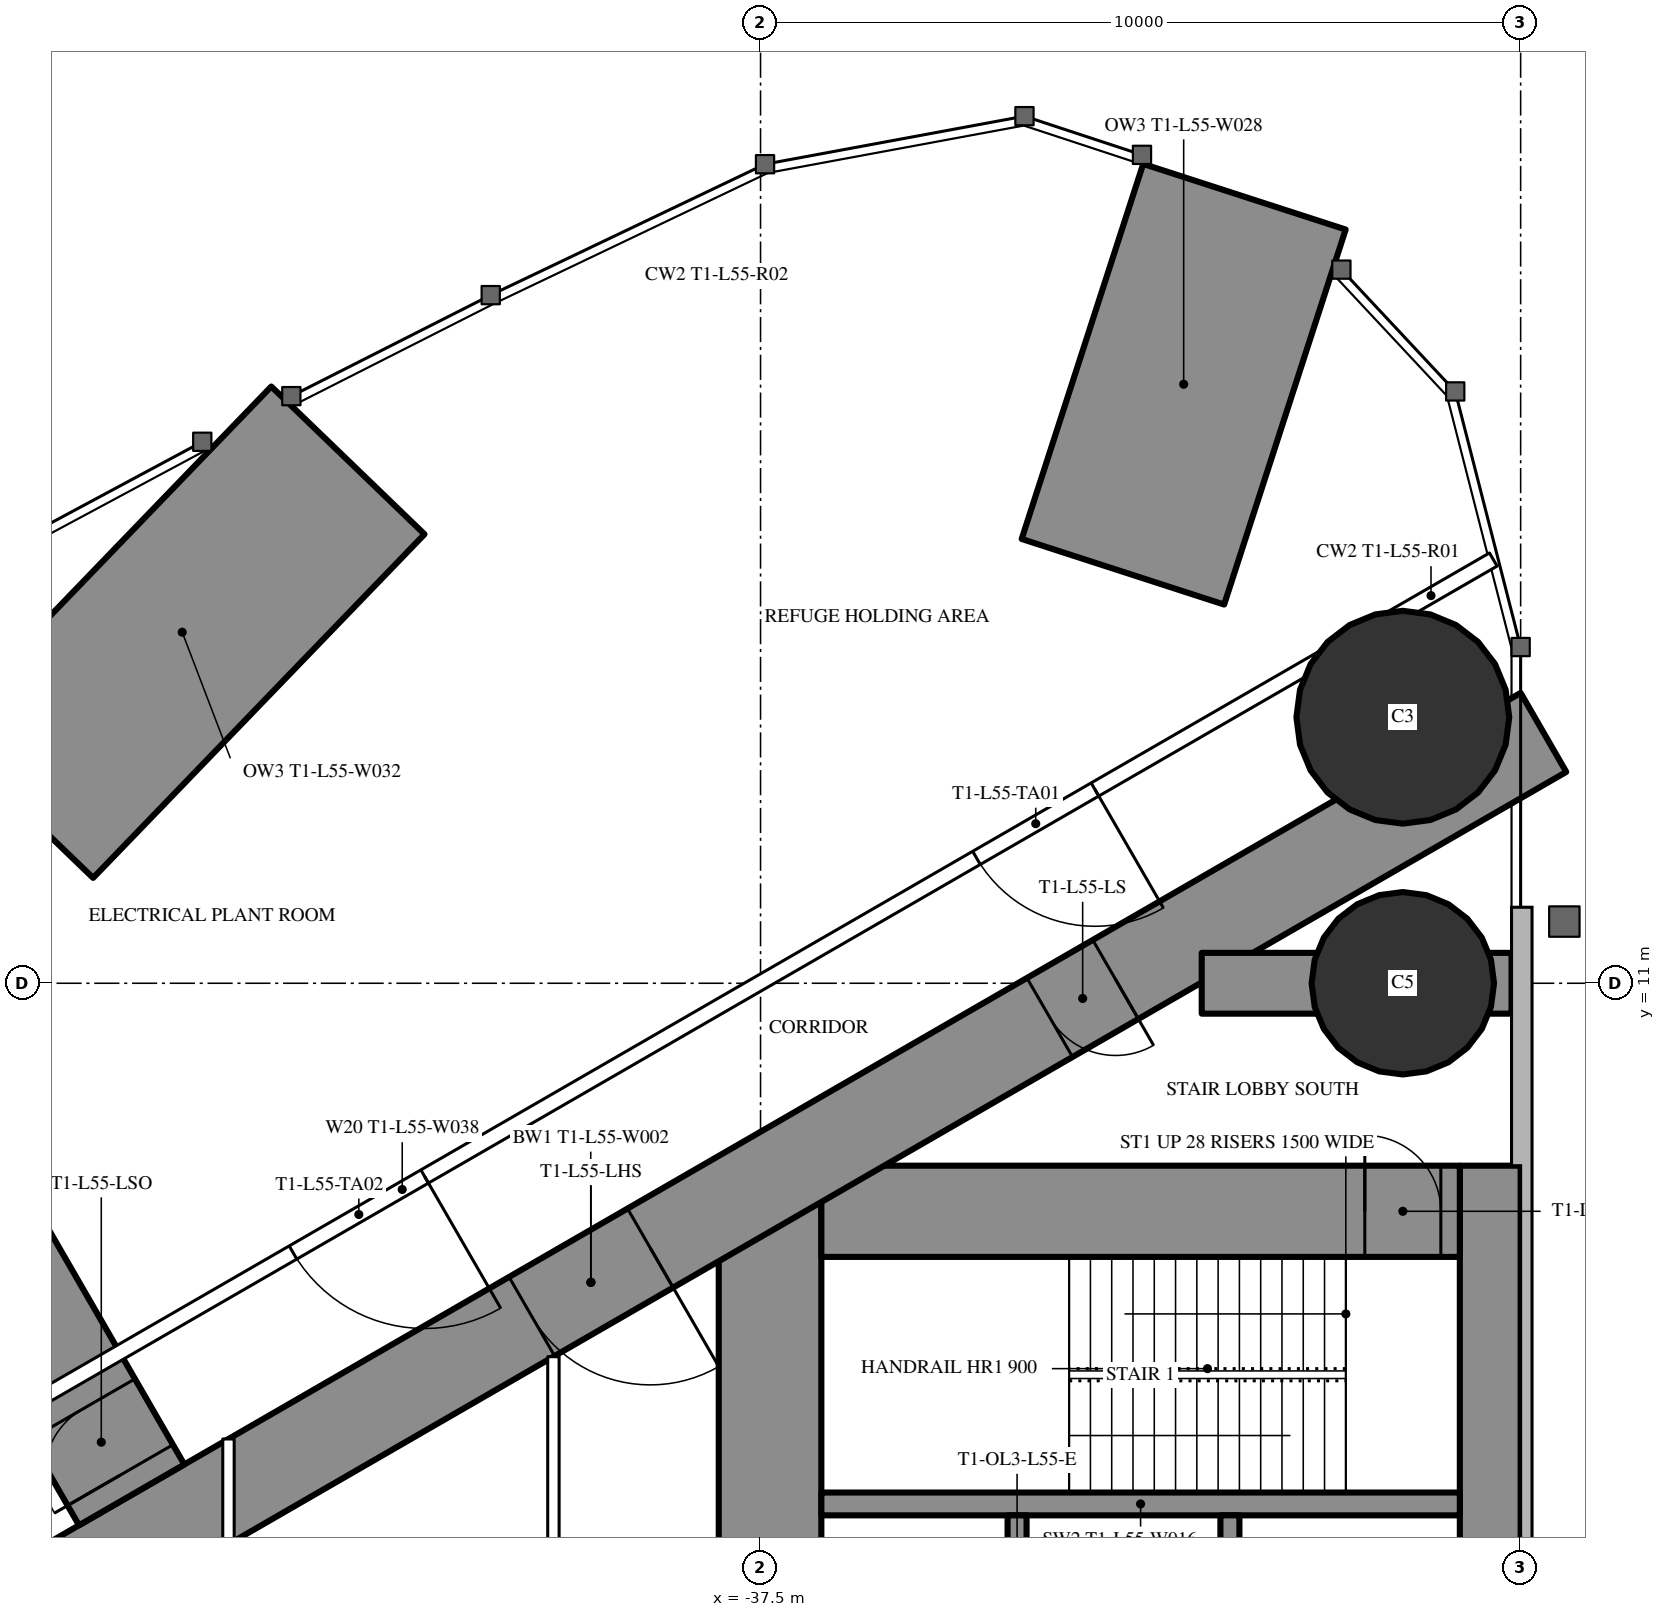
"""IFC4 building model, lengths in metres.
Left out: names, types, materials, properties, quantities, classifications, styles, units other than length and angle.
Written with IfcOpenShell. Run it as: python <this file> out.ifc"""

import sys

from ifc_helpers import new_model, si_unit, direction, frame, frame_2d, origin, origin_2d, place, context, subcontext, project, spatial, rectangle, circle, hollow_circle, extrude, element, fill, save


model = new_model("IFC4")
c1 = context("Model", 3, precision=1e-05, world=origin(), true_north=direction((0.0, 1.0)))
c2 = subcontext(c1, "Body", "Model", "MODEL_VIEW")
j1 = project(units=[si_unit("LENGTHUNIT", "METRE"), si_unit("PLANEANGLEUNIT", "RADIAN")], contexts=[c1])
p1 = place(None, origin())
s1 = spatial("IfcSite", under=j1, at=p1, CompositionType="ELEMENT")
p2 = place(p1, origin())
s2 = spatial("IfcBuilding", under=s1, at=p2, CompositionType="ELEMENT")
p3 = place(p2, frame((0.0, 0.0, 205.3)))
s3 = spatial("IfcBuildingStorey", under=s2, at=p3, CompositionType="ELEMENT", Elevation=205.3)
p4 = place(p3, frame((-31.134, 21.348, 0.0), z_axis=(0.0, 0.0, 1.0), x_axis=(-0.308266410133, -0.951300068529, 0.0)))
e1 = element("IfcWall", 1, at=p4, inside=s3, PredefinedType="SHEAR", context=c2, shape_type="SweptSolid", body=[
    extrude(rectangle(XDim=5.187, YDim=2.8, at=frame_2d((2.593, 0.0))), origin(), (0.0, 0.0, 1.0), 5.0),
])
p5 = place(p3, frame((-29.05, 11.0, 0.0), z_axis=(0.0, 0.0, 1.0), x_axis=(1.0, 0.0, 0.0)))
e2 = element("IfcColumn", 2, at=p5, inside=s3, PredefinedType="COLUMN", context=c2, shape_type="SweptSolid", body=[
    extrude(hollow_circle(Radius=1.2, WallThickness=0.09, at=origin_2d()), origin(), (0.0, 0.0, 1.0), 5.0),
])
p6 = place(p3, frame((-29.05, 14.5, 0.0), z_axis=(0.0, 0.0, 1.0), x_axis=(1.0, 0.0, 0.0)))
e3 = element("IfcColumn", 3, at=p6, inside=s3, PredefinedType="COLUMN", context=c2, shape_type="SweptSolid", body=[
    extrude(circle(Radius=1.4, at=origin_2d()), origin(), (0.0, 0.0, 1.0), 5.0),
])
p7 = place(p3, frame((-42.929, 17.879, 0.0), z_axis=(0.0, 0.0, 1.0), x_axis=(-0.694103918888, -0.719874815356, 0.0)))
e4 = element("IfcWall", 4, at=p7, inside=s3, PredefinedType="SHEAR", context=c2, shape_type="SweptSolid", body=[
    extrude(rectangle(XDim=6.281, YDim=2.8, at=frame_2d((3.141, 0.0))), origin(), (0.0, 0.0, 1.0), 5.0),
])
p8 = place(p3, frame((-27.9, 8.6, 0.0), z_axis=(0.0, 0.0, 1.0), x_axis=(0.0, -1.0, 0.0)))
e5 = element("IfcWall", 5, at=p8, inside=s3, PredefinedType="SHEAR", context=c2, shape_type="SweptSolid", body=[
    extrude(rectangle(XDim=17.2, YDim=0.8, at=frame_2d((8.6, 0.0))), origin(), (0.0, 0.0, 1.0), 5.0),
])
p9 = place(p8, frame((6.95, 0.0, 0.0)))
e6 = element("IfcOpeningElement", 6, at=p9, cuts=e5, PredefinedType="OPENING", context=c2, shape_type="SweptSolid", body=[
    extrude(rectangle(XDim=0.9, YDim=2.2, at=frame_2d((0.45, 1.1))), frame((0.0, 0.41, 0.0), z_axis=(0.0, -1.0, 0.0), x_axis=(1.0, 0.0, 0.0)), (0.0, 0.0, 1.0), 0.82),
])
p10 = place(p3, frame((-37.375, 8.6, 0.0), z_axis=(0.0, 0.0, 1.0), x_axis=(0.0, -1.0, 0.0)))
e7 = element("IfcWall", 7, at=p10, inside=s3, PredefinedType="SHEAR", context=c2, shape_type="SweptSolid", body=[
    extrude(rectangle(XDim=17.2, YDim=1.35, at=frame_2d((8.6, 0.0))), origin(), (0.0, 0.0, 1.0), 5.0),
])
p11 = place(p10, frame((7.7, 0.0, 0.0)))
e8 = element("IfcOpeningElement", 8, at=p11, cuts=e7, PredefinedType="OPENING", context=c2, shape_type="SweptSolid", body=[
    extrude(rectangle(XDim=1.8, YDim=2.2, at=frame_2d((0.9, 1.1))), frame((0.0, 0.685, 0.0), z_axis=(0.0, -1.0, 0.0), x_axis=(1.0, 0.0, 0.0)), (0.0, 0.0, 1.0), 1.37),
])
p12 = place(p3, frame((-28.3, 8.0, 0.0), z_axis=(0.0, 0.0, 1.0), x_axis=(-1.0, 0.0, 0.0)))
e9 = element("IfcWall", 9, at=p12, inside=s3, PredefinedType="SHEAR", context=c2, shape_type="SweptSolid", body=[
    extrude(rectangle(XDim=8.4, YDim=1.2, at=frame_2d((4.2, 0.0))), origin(), (0.0, 0.0, 1.0), 5.0),
])
p13 = place(p12, frame((0.25, 0.0, 0.0)))
e10 = element("IfcOpeningElement", 10, at=p13, cuts=e9, PredefinedType="OPENING", context=c2, shape_type="SweptSolid", body=[
    extrude(rectangle(XDim=1.0, YDim=2.2, at=frame_2d((0.5, 1.1))), frame((0.0, 0.61, 0.0), z_axis=(0.0, -1.0, 0.0), x_axis=(1.0, 0.0, 0.0)), (0.0, 0.0, 1.0), 1.22),
])
p14 = place(p3, frame((-28.3, 4.15, 0.0), z_axis=(0.0, 0.0, 1.0), x_axis=(-1.0, 0.0, 0.0)))
e11 = element("IfcWall", 11, at=p14, inside=s3, PredefinedType="SHEAR", context=c2, shape_type="SweptSolid", body=[
    extrude(rectangle(XDim=8.4, YDim=0.3, at=frame_2d((4.2, 0.0))), origin(), (0.0, 0.0, 1.0), 5.0),
])
p15 = place(p3, frame((-31.325, 4.0, 0.0), z_axis=(0.0, 0.0, 1.0), x_axis=(0.0, -1.0, 0.0)))
e12 = element("IfcWall", 12, at=p15, inside=s3, PredefinedType="SHEAR", context=c2, shape_type="SweptSolid", body=[
    extrude(rectangle(XDim=2.1, YDim=0.25, at=frame_2d((1.05, 0.0))), origin(), (0.0, 0.0, 1.0), 5.0),
])
p16 = place(p15, frame((0.5, 0.0, 0.0)))
e13 = element("IfcOpeningElement", 13, at=p16, cuts=e12, PredefinedType="OPENING", context=c2, shape_type="SweptSolid", body=[
    extrude(rectangle(XDim=1.1, YDim=2.2, at=frame_2d((0.55, 1.1))), frame((0.0, 0.135, 0.0), z_axis=(0.0, -1.0, 0.0), x_axis=(1.0, 0.0, 0.0)), (0.0, 0.0, 1.0), 0.27),
])
p17 = place(p3, frame((-34.125, 4.0, 0.0), z_axis=(0.0, 0.0, 1.0), x_axis=(0.0, -1.0, 0.0)))
e14 = element("IfcWall", 14, at=p17, inside=s3, PredefinedType="SHEAR", context=c2, shape_type="SweptSolid", body=[
    extrude(rectangle(XDim=2.35, YDim=0.25, at=frame_2d((1.175, 0.0))), origin(), (0.0, 0.0, 1.0), 5.0),
])
p18 = place(p17, frame((0.875, 0.0, 0.0)))
e15 = element("IfcOpeningElement", 15, at=p18, cuts=e14, PredefinedType="OPENING", context=c2, shape_type="SweptSolid", body=[
    extrude(rectangle(XDim=0.6, YDim=2.0, at=frame_2d((0.3, 1.0))), frame((0.0, 0.135, 0.0), z_axis=(0.0, -1.0, 0.0), x_axis=(1.0, 0.0, 0.0)), (0.0, 0.0, 1.0), 0.27),
])
p19 = place(p3, frame((-27.2, 14.3, 0.0), z_axis=(0.0, 0.0, 1.0), x_axis=(-0.866026593062, -0.499997940104, 0.0)))
e16 = element("IfcWall", 16, at=p19, inside=s3, PredefinedType="SHEAR", context=c2, shape_type="SweptSolid", body=[
    extrude(rectangle(XDim=28.946, YDim=1.2, at=frame_2d((14.473, 0.0))), origin(), (0.0, 0.0, 1.0), 5.0),
])
p20 = place(p19, frame((6.5, 0.0, 0.0)))
e17 = element("IfcOpeningElement", 17, at=p20, cuts=e16, PredefinedType="OPENING", context=c2, shape_type="SweptSolid", body=[
    extrude(rectangle(XDim=1.0, YDim=2.2, at=frame_2d((0.5, 1.1))), frame((0.0, 0.61, 0.0), z_axis=(0.0, -1.0, 0.0), x_axis=(1.0, 0.0, 0.0)), (0.0, 0.0, 1.0), 1.22),
])
p21 = place(p19, frame((13.568, 0.0, 0.0)))
e18 = element("IfcOpeningElement", 18, at=p21, cuts=e16, PredefinedType="OPENING", context=c2, shape_type="SweptSolid", body=[
    extrude(rectangle(XDim=1.8, YDim=2.2, at=frame_2d((0.9, 1.1))), frame((0.0, 0.61, 0.0), z_axis=(0.0, -1.0, 0.0), x_axis=(1.0, 0.0, 0.0)), (0.0, 0.0, 1.0), 1.22),
])
p22 = place(p3, frame((-27.62, 11.0, 0.0), z_axis=(0.0, 0.0, 1.0), x_axis=(-1.0, 0.0, 0.0)))
e19 = element("IfcWall", 19, at=p22, inside=s3, PredefinedType="SHEAR", context=c2, shape_type="SweptSolid", body=[
    extrude(rectangle(XDim=4.076, YDim=0.8, at=frame_2d((2.038, 0.0))), origin(), (0.0, 0.0, 1.0), 5.0),
])
p23 = place(p3, frame((-45.773, 4.27, 0.0), z_axis=(0.0, 0.0, 1.0), x_axis=(-0.499995723283, 0.866027872934, 0.0)))
e20 = element("IfcWall", 20, at=p23, inside=s3, PredefinedType="SHEAR", context=c2, shape_type="SweptSolid", body=[
    extrude(rectangle(XDim=10.131, YDim=1.6, at=frame_2d((5.065, 0.0))), origin(), (0.0, 0.0, 1.0), 5.0),
])
p24 = place(p23, frame((0.3, 0.0, 0.0)))
e21 = element("IfcOpeningElement", 21, at=p24, cuts=e20, PredefinedType="OPENING", context=c2, shape_type="SweptSolid", body=[
    extrude(rectangle(XDim=1.0, YDim=2.2, at=frame_2d((0.5, 1.1))), frame((0.0, 0.81, 0.0), z_axis=(0.0, -1.0, 0.0), x_axis=(1.0, 0.0, 0.0)), (0.0, 0.0, 1.0), 1.62),
])
p25 = place(p3, frame((-27.86, 16.575, 0.0), z_axis=(0.0, 0.0, 1.0), x_axis=(-0.866025533911, -0.499999774615, 0.0)))
e22 = element("IfcWall", 22, at=p25, inside=s3, PredefinedType="PARTITIONING", context=c2, shape_type="SweptSolid", body=[
    extrude(rectangle(XDim=33.149, YDim=0.2, at=frame_2d((16.575, 0.0))), origin(), (0.0, 0.0, 1.0), 4.75),
])
p26 = place(p25, frame((6.051, 0.0, 0.0)))
e23 = element("IfcOpeningElement", 23, at=p26, cuts=e22, PredefinedType="OPENING", context=c2, shape_type="SweptSolid", body=[
    extrude(rectangle(XDim=1.8, YDim=2.2, at=frame_2d((0.9, 1.1))), frame((0.0, 0.11, 0.0), z_axis=(0.0, -1.0, 0.0), x_axis=(1.0, 0.0, 0.0)), (0.0, 0.0, 1.0), 0.22),
])
p27 = place(p25, frame((16.234, 0.0, 0.0)))
e24 = element("IfcOpeningElement", 24, at=p27, cuts=e22, PredefinedType="OPENING", context=c2, shape_type="SweptSolid", body=[
    extrude(rectangle(XDim=2.0, YDim=2.4, at=frame_2d((1.0, 1.2))), frame((0.0, 0.11, 0.0), z_axis=(0.0, -1.0, 0.0), x_axis=(1.0, 0.0, 0.0)), (0.0, 0.0, 1.0), 0.22),
])
p28 = place(p25, frame((26.082, 0.0, 0.0)))
e25 = element("IfcOpeningElement", 25, at=p28, cuts=e22, PredefinedType="OPENING", context=c2, shape_type="SweptSolid", body=[
    extrude(rectangle(XDim=2.0, YDim=2.4, at=frame_2d((1.0, 1.2))), frame((0.0, 0.11, 0.0), z_axis=(0.0, -1.0, 0.0), x_axis=(1.0, 0.0, 0.0)), (0.0, 0.0, 1.0), 0.22),
])
p29 = place(p3, frame((-40.225, 6.087, 0.0), z_axis=(0.0, 0.0, 1.0), x_axis=(0.0, -1.0, 0.0)))
e26 = element("IfcWall", 26, at=p29, inside=s3, PredefinedType="PARTITIONING", context=c2, shape_type="SweptSolid", body=[
    extrude(rectangle(XDim=12.174, YDim=0.15, at=frame_2d((6.087, 0.0))), origin(), (0.0, 0.0, 1.0), 4.75),
])
p30 = place(p29, frame((5.187, 0.0, 0.0)))
e27 = element("IfcOpeningElement", 27, at=p30, cuts=e26, PredefinedType="OPENING", context=c2, shape_type="SweptSolid", body=[
    extrude(rectangle(XDim=1.8, YDim=2.2, at=frame_2d((0.9, 1.1))), frame((0.0, 0.085, 0.0), z_axis=(0.0, -1.0, 0.0), x_axis=(1.0, 0.0, 0.0)), (0.0, 0.0, 1.0), 0.17),
])
p31 = place(p3, frame((-44.5, 5.005, 0.0), z_axis=(0.0, 0.0, 1.0), x_axis=(0.0, -1.0, 0.0)))
e28 = element("IfcWall", 28, at=p31, inside=s3, PredefinedType="PARTITIONING", context=c2, shape_type="SweptSolid", body=[
    extrude(rectangle(XDim=10.009, YDim=0.15, at=frame_2d((5.005, 0.0))), origin(), (0.0, 0.0, 1.0), 3.55),
])
p32 = place(p31, frame((4.505, 0.0, 0.0)))
e29 = element("IfcOpeningElement", 29, at=p32, cuts=e28, PredefinedType="OPENING", context=c2, shape_type="SweptSolid", body=[
    extrude(rectangle(XDim=1.0, YDim=2.2, at=frame_2d((0.5, 1.1))), frame((0.0, 0.085, 0.0), z_axis=(0.0, -1.0, 0.0), x_axis=(1.0, 0.0, 0.0)), (0.0, 0.0, 1.0), 0.17),
])
p33 = place(p24, origin())
e30 = element("IfcDoor", 30, at=p33, inside=s3, OperationType="SINGLE_SWING_LEFT", PredefinedType="DOOR", context=c2, shape_type="SweptSolid", body=[
    extrude(rectangle(XDim=1.0, YDim=2.2, at=frame_2d((0.5, 1.1))), frame((0.0, 0.025, 0.0), z_axis=(0.0, -1.0, 0.0), x_axis=(1.0, 0.0, 0.0)), (0.0, 0.0, 1.0), 0.05),
])
fill(e21, e30)
p34 = place(p26, origin())
e31 = element("IfcDoor", 31, at=p34, inside=s3, OperationType="DOUBLE_DOOR_SINGLE_SWING", PredefinedType="DOOR", context=c2, shape_type="SweptSolid", body=[
    extrude(rectangle(XDim=1.8, YDim=2.2, at=frame_2d((0.9, 1.1))), frame((0.0, 0.025, 0.0), z_axis=(0.0, -1.0, 0.0), x_axis=(1.0, 0.0, 0.0)), (0.0, 0.0, 1.0), 0.05),
])
fill(e23, e31)
p35 = place(p27, origin())
e32 = element("IfcDoor", 32, at=p35, inside=s3, OperationType="DOUBLE_DOOR_SINGLE_SWING", PredefinedType="DOOR", context=c2, shape_type="SweptSolid", body=[
    extrude(rectangle(XDim=2.0, YDim=2.4, at=frame_2d((1.0, 1.2))), frame((0.0, 0.025, 0.0), z_axis=(0.0, -1.0, 0.0), x_axis=(1.0, 0.0, 0.0)), (0.0, 0.0, 1.0), 0.05),
])
fill(e24, e32)
p36 = place(p20, origin())
e33 = element("IfcDoor", 33, at=p36, inside=s3, OperationType="SINGLE_SWING_LEFT", PredefinedType="DOOR", context=c2, shape_type="SweptSolid", body=[
    extrude(rectangle(XDim=1.0, YDim=2.2, at=frame_2d((0.5, 1.1))), frame((0.0, 0.025, 0.0), z_axis=(0.0, -1.0, 0.0), x_axis=(1.0, 0.0, 0.0)), (0.0, 0.0, 1.0), 0.05),
])
fill(e17, e33)
p37 = place(p21, origin())
e34 = element("IfcDoor", 34, at=p37, inside=s3, OperationType="DOUBLE_DOOR_SINGLE_SWING", PredefinedType="DOOR", context=c2, shape_type="SweptSolid", body=[
    extrude(rectangle(XDim=1.8, YDim=2.2, at=frame_2d((0.9, 1.1))), frame((0.0, 0.025, 0.0), z_axis=(0.0, -1.0, 0.0), x_axis=(1.0, 0.0, 0.0)), (0.0, 0.0, 1.0), 0.05),
])
fill(e18, e34)
p38 = place(p13, origin())
e35 = element("IfcDoor", 35, at=p38, inside=s3, OperationType="SINGLE_SWING_RIGHT", PredefinedType="DOOR", context=c2, shape_type="SweptSolid", body=[
    extrude(rectangle(XDim=1.0, YDim=2.2, at=frame_2d((0.5, 1.1))), frame((0.0, 0.025, 0.0), z_axis=(0.0, -1.0, 0.0), x_axis=(1.0, 0.0, 0.0)), (0.0, 0.0, 1.0), 0.05),
])
fill(e10, e35)
save(model, sys.argv[1])
